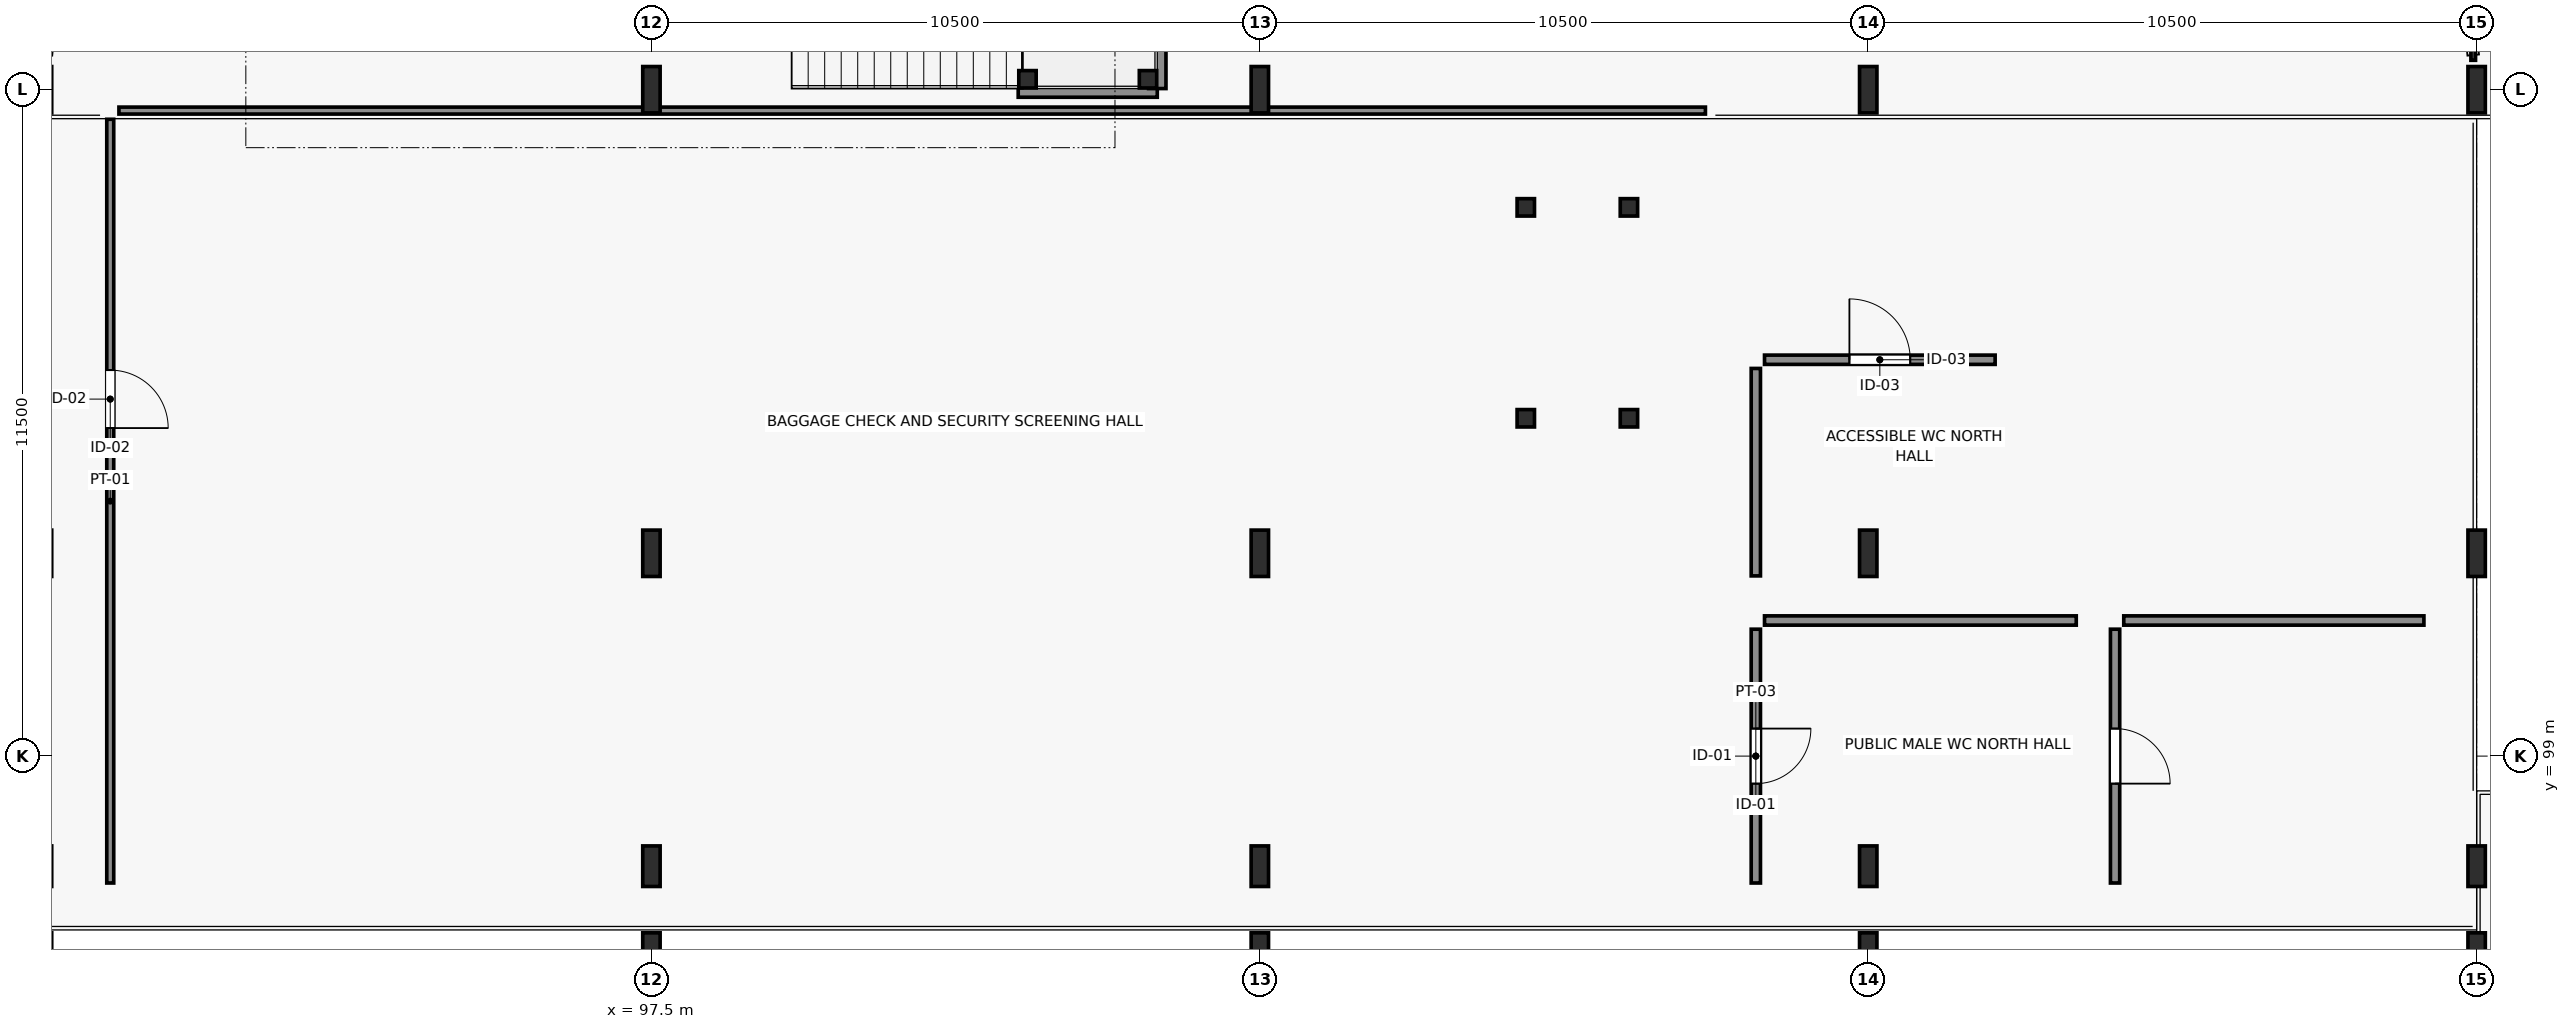
"""IFC4 building model, lengths in metres.
Left out: names, types, materials, properties, quantities, classifications, styles, units other than length and angle.
Written with IfcOpenShell. Run it as: python <this file> out.ifc"""

import sys

from ifc_helpers import new_model, si_unit, direction, frame, frame_2d, origin, origin_2d, place, context, subcontext, project, spatial, rectangle, hollow_rectangle, i_section, extrude, element, fill, save


model = new_model("IFC4")
c1 = context("Model", 3, precision=1e-05, world=origin(), true_north=direction((0.0, 1.0)))
c2 = subcontext(c1, "Body", "Model", "MODEL_VIEW")
j1 = project(units=[si_unit("LENGTHUNIT", "METRE"), si_unit("PLANEANGLEUNIT", "RADIAN")], contexts=[c1])
p1 = place(None, origin())
s1 = spatial("IfcSite", under=j1, at=p1, CompositionType="ELEMENT")
p2 = place(p1, origin())
s2 = spatial("IfcBuilding", under=s1, at=p2, CompositionType="ELEMENT")
p3 = place(p2, frame((0.0, 0.0, 4.8)))
s3 = spatial("IfcBuildingStorey", under=s2, at=p3, CompositionType="ELEMENT", Elevation=4.8)
for number, where, z_axis, x_axis in (
    (1, (97.5, 95.5, 0.0), (0.0, 0.0, 1.0), (1.0, 0.0, 0.0)),
    (2, (108.0, 95.5, 0.0), (0.0, 0.0, 1.0), (1.0, 0.0, 0.0)),
    (3, (118.5, 95.5, 0.0), (0.0, 0.0, 1.0), (1.0, 0.0, 0.0)),
    (4, (129.0, 95.5, 0.0), (0.0, 0.0, 1.0), (1.0, 0.0, 0.0)),
):
    element("IfcColumn", number, at=place(p3, frame(where, z_axis=z_axis, x_axis=x_axis)), inside=s3, PredefinedType="COLUMN", context=c2, shape_type="SweptSolid", body=[
        extrude(i_section(OverallWidth=0.3, OverallDepth=0.9, WebThickness=0.019, FlangeThickness=0.035, FilletRadius=0.03, at=origin_2d()), origin(), (0.0, 0.0, 1.0), 4.815),
    ])
for number, where, z_axis, x_axis in (
    (5, (97.5, 102.5, 0.0), (0.0, 0.0, 1.0), (1.0, 0.0, 0.0)),
    (6, (108.0, 102.5, 0.0), (0.0, 0.0, 1.0), (1.0, 0.0, 0.0)),
    (7, (118.5, 102.5, 0.0), (0.0, 0.0, 1.0), (1.0, 0.0, 0.0)),
    (8, (129.0, 102.5, 0.0), (0.0, 0.0, 1.0), (1.0, 0.0, 0.0)),
    (9, (97.5, 110.5, 0.0), (0.0, 0.0, 1.0), (1.0, 0.0, 0.0)),
    (10, (108.0, 110.5, 0.0), (0.0, 0.0, 1.0), (1.0, 0.0, 0.0)),
    (11, (118.5, 110.5, 0.0), (0.0, 0.0, 1.0), (1.0, 0.0, 0.0)),
    (12, (129.0, 110.5, 0.0), (0.0, 0.0, 1.0), (1.0, 0.0, 0.0)),
):
    element("IfcColumn", number, at=place(p3, frame(where, z_axis=z_axis, x_axis=x_axis)), inside=s3, PredefinedType="COLUMN", context=c2, shape_type="SweptSolid", body=[
        extrude(i_section(OverallWidth=0.3, OverallDepth=0.8, WebThickness=0.018, FlangeThickness=0.033, FilletRadius=0.03, at=origin_2d()), origin(), (0.0, 0.0, 1.0), 4.815),
    ])
for number, where, z_axis, x_axis in (
    (13, (97.5, 97.1, 0.0), (0.0, 0.0, 1.0), (1.0, 0.0, 0.0)),
    (14, (108.0, 97.1, 0.0), (0.0, 0.0, 1.0), (1.0, 0.0, 0.0)),
    (15, (118.5, 97.1, 0.0), (0.0, 0.0, 1.0), (1.0, 0.0, 0.0)),
    (16, (129.0, 97.1, 0.0), (0.0, 0.0, 1.0), (1.0, 0.0, 0.0)),
):
    element("IfcColumn", number, at=place(p3, frame(where, z_axis=z_axis, x_axis=x_axis)), inside=s3, PredefinedType="COLUMN", context=c2, shape_type="SweptSolid", body=[
        extrude(i_section(OverallWidth=0.3, OverallDepth=0.7, WebThickness=0.017, FlangeThickness=0.032, FilletRadius=0.027, at=origin_2d()), origin(), (0.0, 0.0, 1.0), 4.815),
    ])
p4 = place(p3, frame((88.16, 109.99, 0.0), z_axis=(0.0, 0.0, 1.0), x_axis=(0.0, -1.0, 0.0)))
e17 = element("IfcWall", 17, at=p4, inside=s3, PredefinedType="PARTITIONING", context=c2, shape_type="SweptSolid", body=[
    extrude(rectangle(XDim=13.18, YDim=0.12, at=frame_2d((6.59, 0.0))), origin(), (0.0, 0.0, 1.0), 4.235),
])
p5 = place(p4, frame((4.329, 0.0, 0.0)))
e18 = element("IfcOpeningElement", 18, at=p5, cuts=e17, PredefinedType="OPENING", context=c2, shape_type="SweptSolid", body=[
    extrude(rectangle(XDim=1.0, YDim=2.15, at=frame_2d((0.5, 1.075))), frame((0.0, 0.07, 0.0), z_axis=(0.0, -1.0, 0.0), x_axis=(1.0, 0.0, 0.0)), (0.0, 0.0, 1.0), 0.14),
])
p6 = place(p3, frame((88.31, 110.14, 0.0), z_axis=(0.0, 0.0, 1.0), x_axis=(1.0, 0.0, 0.0)))
e19 = element("IfcWall", 19, at=p6, inside=s3, PredefinedType="PARTITIONING", context=c2, shape_type="SweptSolid", body=[
    extrude(rectangle(XDim=27.38, YDim=0.12, at=frame_2d((13.69, 0.0))), origin(), (0.0, 0.0, 1.0), 3.435),
])
p7 = place(p3, frame((116.56, 101.19, 0.0), z_axis=(0.0, 0.0, 1.0), x_axis=(0.0, -1.0, 0.0)))
e20 = element("IfcWall", 20, at=p7, inside=s3, PredefinedType="PARTITIONING", context=c2, shape_type="SweptSolid", body=[
    extrude(rectangle(XDim=4.38, YDim=0.16, at=frame_2d((2.19, 0.0))), origin(), (0.0, 0.0, 1.0), 4.75),
])
p8 = place(p7, frame((1.715, 0.0, 0.0)))
e21 = element("IfcOpeningElement", 21, at=p8, cuts=e20, PredefinedType="OPENING", context=c2, shape_type="SweptSolid", body=[
    extrude(rectangle(XDim=0.95, YDim=2.15, at=frame_2d((0.475, 1.075))), frame((0.0, 0.09, 0.0), z_axis=(0.0, -1.0, 0.0), x_axis=(1.0, 0.0, 0.0)), (0.0, 0.0, 1.0), 0.18),
])
p9 = place(p3, frame((116.71, 101.34, 0.0), z_axis=(0.0, 0.0, 1.0), x_axis=(1.0, 0.0, 0.0)))
e22 = element("IfcWall", 22, at=p9, inside=s3, PredefinedType="PARTITIONING", context=c2, shape_type="SweptSolid", body=[
    extrude(rectangle(XDim=5.38, YDim=0.16, at=frame_2d((2.69, 0.0))), origin(), (0.0, 0.0, 1.0), 3.435),
])
p10 = place(p3, frame((122.76, 101.19, 0.0), z_axis=(0.0, 0.0, 1.0), x_axis=(0.0, -1.0, 0.0)))
e23 = element("IfcWall", 23, at=p10, inside=s3, PredefinedType="PARTITIONING", context=c2, shape_type="SweptSolid", body=[
    extrude(rectangle(XDim=4.38, YDim=0.16, at=frame_2d((2.19, 0.0))), origin(), (0.0, 0.0, 1.0), 4.75),
])
p11 = place(p10, frame((1.715, 0.0, 0.0)))
e24 = element("IfcOpeningElement", 24, at=p11, cuts=e23, PredefinedType="OPENING", context=c2, shape_type="SweptSolid", body=[
    extrude(rectangle(XDim=0.95, YDim=2.15, at=frame_2d((0.475, 1.075))), frame((0.0, 0.09, 0.0), z_axis=(0.0, -1.0, 0.0), x_axis=(1.0, 0.0, 0.0)), (0.0, 0.0, 1.0), 0.18),
])
p12 = place(p3, frame((122.91, 101.34, 0.0), z_axis=(0.0, 0.0, 1.0), x_axis=(1.0, 0.0, 0.0)))
e25 = element("IfcWall", 25, at=p12, inside=s3, PredefinedType="PARTITIONING", context=c2, shape_type="SweptSolid", body=[
    extrude(rectangle(XDim=5.18, YDim=0.16, at=frame_2d((2.59, 0.0))), origin(), (0.0, 0.0, 1.0), 4.75),
])
p13 = place(p3, frame((116.71, 105.84, 0.0), z_axis=(0.0, 0.0, 1.0), x_axis=(1.0, 0.0, 0.0)))
e26 = element("IfcWall", 26, at=p13, inside=s3, PredefinedType="PARTITIONING", context=c2, shape_type="SweptSolid", body=[
    extrude(rectangle(XDim=3.98, YDim=0.16, at=frame_2d((1.99, 0.0))), origin(), (0.0, 0.0, 1.0), 3.435),
])
p14 = place(p13, frame((1.465, 0.0, 0.0)))
e27 = element("IfcOpeningElement", 27, at=p14, cuts=e26, PredefinedType="OPENING", context=c2, shape_type="SweptSolid", body=[
    extrude(rectangle(XDim=1.05, YDim=2.2, at=frame_2d((0.525, 1.1))), frame((0.0, 0.09, 0.0), z_axis=(0.0, -1.0, 0.0), x_axis=(1.0, 0.0, 0.0)), (0.0, 0.0, 1.0), 0.18),
])
p15 = place(p3, frame((116.56, 102.11, 0.0), z_axis=(0.0, 0.0, 1.0), x_axis=(0.0, 1.0, 0.0)))
e28 = element("IfcWall", 28, at=p15, inside=s3, PredefinedType="PARTITIONING", context=c2, shape_type="SweptSolid", body=[
    extrude(rectangle(XDim=3.58, YDim=0.16, at=frame_2d((1.79, 0.0))), origin(), (0.0, 0.0, 1.0), 4.235),
])
p16 = place(p3, frame((103.83, 110.52, 0.0), z_axis=(0.0, 0.0, 1.0), x_axis=(1.0, 0.0, 0.0)))
e29 = element("IfcWall", 29, at=p16, inside=s3, PredefinedType="SHEAR", context=c2, shape_type="SweptSolid", body=[
    extrude(rectangle(XDim=2.4, YDim=0.3, at=frame_2d((1.2, 0.0))), origin(), (0.0, 0.0, 1.0), 4.235),
])
p17 = place(p3, frame((106.23, 110.52, 0.0), z_axis=(0.0, 0.0, 1.0), x_axis=(0.0, 1.0, 0.0)))
e30 = element("IfcWall", 30, at=p17, inside=s3, PredefinedType="SHEAR", context=c2, shape_type="SweptSolid", body=[
    extrude(rectangle(XDim=4.56, YDim=0.3, at=frame_2d((2.28, 0.0))), origin(), (0.0, 0.0, 1.0), 4.235),
])
for number, where, z_axis, x_axis in (
    (31, (103.99, 110.68, 0.0), (0.0, 0.0, 1.0), (1.0, 0.0, 0.0)),
    (32, (106.07, 110.68, 0.0), (0.0, 0.0, 1.0), (1.0, 0.0, 0.0)),
):
    element("IfcColumn", number, at=place(p3, frame(where, z_axis=z_axis, x_axis=x_axis)), inside=s3, PredefinedType="COLUMN", context=c2, shape_type="SweptSolid", body=[
        extrude(hollow_rectangle(XDim=0.3, YDim=0.3, WallThickness=0.016, at=origin_2d()), origin(), (0.0, 0.0, 1.0), 2.18),
    ])
for number, where, z_axis, x_axis in (
    (33, (112.59, 104.83, 0.0), (0.0, 0.0, 1.0), (1.0, 0.0, 0.0)),
    (34, (114.37, 104.83, 0.0), (0.0, 0.0, 1.0), (1.0, 0.0, 0.0)),
    (35, (114.37, 108.47, 0.0), (0.0, 0.0, 1.0), (1.0, 0.0, 0.0)),
    (36, (112.59, 108.47, 0.0), (0.0, 0.0, 1.0), (1.0, 0.0, 0.0)),
):
    element("IfcColumn", number, at=place(p3, frame(where, z_axis=z_axis, x_axis=x_axis)), inside=s3, PredefinedType="COLUMN", context=c2, shape_type="SweptSolid", body=[
        extrude(hollow_rectangle(XDim=0.3, YDim=0.3, WallThickness=0.016, at=origin_2d()), origin(), (0.0, 0.0, 1.0), 5.0),
    ])
p18 = place(p5, origin())
e37 = element("IfcDoor", 37, at=p18, inside=s3, OperationType="SINGLE_SWING_RIGHT", PredefinedType="DOOR", context=c2, shape_type="SweptSolid", body=[
    extrude(rectangle(XDim=1.0, YDim=2.15, at=frame_2d((0.5, 1.075))), frame((0.0, 0.025, 0.0), z_axis=(0.0, -1.0, 0.0), x_axis=(1.0, 0.0, 0.0)), (0.0, 0.0, 1.0), 0.05),
])
fill(e18, e37)
p19 = place(p8, origin())
e38 = element("IfcDoor", 38, at=p19, inside=s3, OperationType="SINGLE_SWING_LEFT", PredefinedType="DOOR", context=c2, shape_type="SweptSolid", body=[
    extrude(rectangle(XDim=0.95, YDim=2.15, at=frame_2d((0.475, 1.075))), frame((0.0, 0.025, 0.0), z_axis=(0.0, -1.0, 0.0), x_axis=(1.0, 0.0, 0.0)), (0.0, 0.0, 1.0), 0.05),
])
fill(e21, e38)
p20 = place(p11, origin())
e39 = element("IfcDoor", 39, at=p20, inside=s3, OperationType="SINGLE_SWING_RIGHT", PredefinedType="DOOR", context=c2, shape_type="SweptSolid", body=[
    extrude(rectangle(XDim=0.95, YDim=2.15, at=frame_2d((0.475, 1.075))), frame((0.0, 0.025, 0.0), z_axis=(0.0, -1.0, 0.0), x_axis=(1.0, 0.0, 0.0)), (0.0, 0.0, 1.0), 0.05),
])
fill(e24, e39)
p21 = place(p14, origin())
e40 = element("IfcDoor", 40, at=p21, inside=s3, OperationType="SINGLE_SWING_LEFT", PredefinedType="DOOR", context=c2, shape_type="SweptSolid", body=[
    extrude(rectangle(XDim=1.05, YDim=2.2, at=frame_2d((0.525, 1.1))), frame((0.0, 0.025, 0.0), z_axis=(0.0, -1.0, 0.0), x_axis=(1.0, 0.0, 0.0)), (0.0, 0.0, 1.0), 0.05),
])
fill(e27, e40)
save(model, sys.argv[1])
